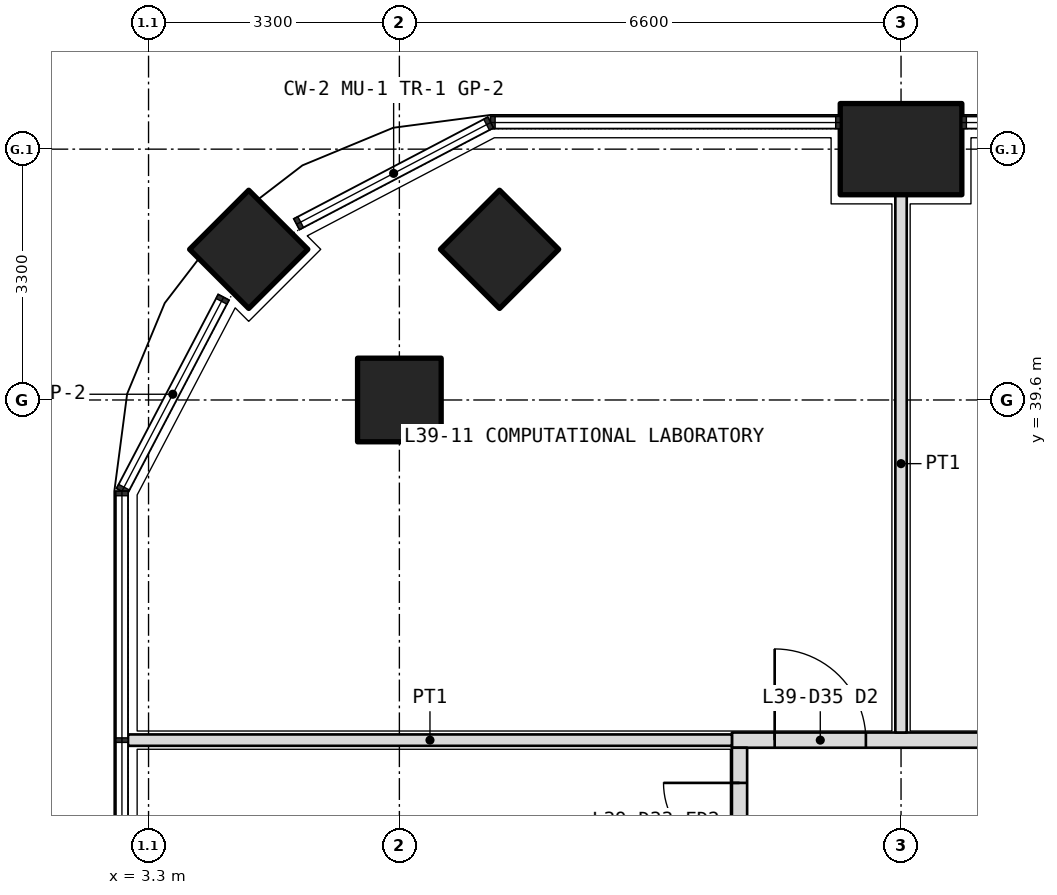
"""IFC4 building model, lengths in metres.
Left out: names, types, materials, properties, quantities, classifications, styles, units other than length and angle.
Written with IfcOpenShell. Run it as: python <this file> out.ifc"""

import sys

from ifc_helpers import new_model, si_unit, direction, frame, frame_2d, origin, origin_2d, place, context, subcontext, project, spatial, rectangle, extrude, element, fill, save


model = new_model("IFC4")
c1 = context("Model", 3, precision=1e-05, world=origin(), true_north=direction((0.0, 1.0)))
c2 = subcontext(c1, "Body", "Model", "MODEL_VIEW")
j1 = project(units=[si_unit("LENGTHUNIT", "METRE"), si_unit("PLANEANGLEUNIT", "RADIAN")], contexts=[c1])
p1 = place(None, origin())
s1 = spatial("IfcSite", under=j1, at=p1, CompositionType="ELEMENT")
p2 = place(p1, origin())
s2 = spatial("IfcBuilding", under=s1, at=p2, CompositionType="ELEMENT")
p3 = place(p2, frame((0.0, 0.0, 172.5)))
s3 = spatial("IfcBuildingStorey", under=s2, at=p3, CompositionType="ELEMENT", Elevation=172.5)
p4 = place(p3, frame((4.618, 41.582, 0.0), z_axis=(0.0, 0.0, 1.0), x_axis=(0.707106781187, 0.707106781187, 0.0)))
e1 = element("IfcColumn", 1, at=p4, inside=s3, PredefinedType="COLUMN", context=c2, shape_type="SweptSolid", body=[
    extrude(rectangle(XDim=1.1, YDim=1.1, at=origin_2d()), origin(), (0.0, 0.0, 1.0), 4.2),
])
p5 = place(p3, frame((13.2, 42.9, 0.0), z_axis=(0.0, 0.0, 1.0), x_axis=(1.0, 0.0, 0.0)))
e2 = element("IfcColumn", 2, at=p5, inside=s3, PredefinedType="COLUMN", context=c2, shape_type="SweptSolid", body=[
    extrude(rectangle(XDim=1.6, YDim=1.2, at=origin_2d()), origin(), (0.0, 0.0, 1.0), 4.2),
])
for number, where, z_axis, x_axis in (
    (3, (6.6, 39.6, 0.0), (0.0, 0.0, 1.0), (1.0, 0.0, 0.0)),
    (4, (7.918, 41.582, 0.0), (0.0, 0.0, 1.0), (0.707, 0.707, 0.0)),
):
    element("IfcColumn", number, at=place(p3, frame(where, z_axis=z_axis, x_axis=x_axis)), inside=s3, PredefinedType="COLUMN", context=c2, shape_type="SweptSolid", body=[
        extrude(rectangle(XDim=1.1, YDim=1.1, at=origin_2d()), origin(), (0.0, 0.0, 1.0), 4.2),
    ])
p6 = place(p3, frame((10.975, 35.125, 0.0), z_axis=(0.0, 0.0, 1.0), x_axis=(1.0, 0.0, 0.0)))
e5 = element("IfcWall", 5, at=p6, inside=s3, PredefinedType="PARTITIONING", context=c2, shape_type="SweptSolid", body=[
    extrude(rectangle(XDim=30.85, YDim=0.2, at=frame_2d((15.425, 0.0))), origin(), (0.0, 0.0, 1.0), 2.85),
])
p7 = place(p6, frame((0.562, 0.0, 0.0)))
e6 = element("IfcOpeningElement", 6, at=p7, cuts=e5, PredefinedType="OPENING", context=c2, shape_type="SweptSolid", body=[
    extrude(rectangle(XDim=1.2, YDim=2.1, at=frame_2d((0.6, 1.05))), frame((0.0, 0.11, 0.0), z_axis=(0.0, -1.0, 0.0), x_axis=(1.0, 0.0, 0.0)), (0.0, 0.0, 1.0), 0.22),
])
p8 = place(p6, frame((8.225, 0.0, 0.0)))
e7 = element("IfcOpeningElement", 7, at=p8, cuts=e5, PredefinedType="OPENING", context=c2, shape_type="SweptSolid", body=[
    extrude(rectangle(XDim=1.2, YDim=2.1, at=frame_2d((0.6, 1.05))), frame((0.0, 0.11, 0.0), z_axis=(0.0, -1.0, 0.0), x_axis=(1.0, 0.0, 0.0)), (0.0, 0.0, 1.0), 0.22),
])
p9 = place(p6, frame((16.625, 0.0, 0.0)))
e8 = element("IfcOpeningElement", 8, at=p9, cuts=e5, PredefinedType="OPENING", context=c2, shape_type="SweptSolid", body=[
    extrude(rectangle(XDim=1.0, YDim=2.1, at=frame_2d((0.5, 1.05))), frame((0.0, 0.11, 0.0), z_axis=(0.0, -1.0, 0.0), x_axis=(1.0, 0.0, 0.0)), (0.0, 0.0, 1.0), 0.22),
])
p10 = place(p6, frame((19.925, 0.0, 0.0)))
e9 = element("IfcOpeningElement", 9, at=p10, cuts=e5, PredefinedType="OPENING", context=c2, shape_type="SweptSolid", body=[
    extrude(rectangle(XDim=1.0, YDim=2.1, at=frame_2d((0.5, 1.05))), frame((0.0, 0.11, 0.0), z_axis=(0.0, -1.0, 0.0), x_axis=(1.0, 0.0, 0.0)), (0.0, 0.0, 1.0), 0.22),
])
p11 = place(p6, frame((23.075, 0.0, 0.0)))
e10 = element("IfcOpeningElement", 10, at=p11, cuts=e5, PredefinedType="OPENING", context=c2, shape_type="SweptSolid", body=[
    extrude(rectangle(XDim=1.2, YDim=2.1, at=frame_2d((0.6, 1.05))), frame((0.0, 0.11, 0.0), z_axis=(0.0, -1.0, 0.0), x_axis=(1.0, 0.0, 0.0)), (0.0, 0.0, 1.0), 0.22),
])
p12 = place(p6, frame((27.438, 0.0, 0.0)))
e11 = element("IfcOpeningElement", 11, at=p12, cuts=e5, PredefinedType="OPENING", context=c2, shape_type="SweptSolid", body=[
    extrude(rectangle(XDim=1.2, YDim=2.1, at=frame_2d((0.6, 1.05))), frame((0.0, 0.11, 0.0), z_axis=(0.0, -1.0, 0.0), x_axis=(1.0, 0.0, 0.0)), (0.0, 0.0, 1.0), 0.22),
])
p13 = place(p3, frame((11.075, 33.0, 0.0), z_axis=(0.0, 0.0, 1.0), x_axis=(0.0, 1.0, 0.0)))
e12 = element("IfcWall", 12, at=p13, inside=s3, PredefinedType="PARTITIONING", context=c2, shape_type="SweptSolid", body=[
    extrude(rectangle(XDim=2.025, YDim=0.2, at=frame_2d((1.012, 0.0))), origin(), (0.0, 0.0, 1.0), 2.85),
])
p14 = place(p13, frame((0.562, 0.0, 0.0)))
e13 = element("IfcOpeningElement", 13, at=p14, cuts=e12, PredefinedType="OPENING", context=c2, shape_type="SweptSolid", body=[
    extrude(rectangle(XDim=1.0, YDim=2.1, at=frame_2d((0.5, 1.05))), frame((0.0, 0.11, 0.0), z_axis=(0.0, -1.0, 0.0), x_axis=(1.0, 0.0, 0.0)), (0.0, 0.0, 1.0), 0.22),
])
p15 = place(p3, frame((3.03, 35.125, 0.0), z_axis=(0.0, 0.0, 1.0), x_axis=(1.0, 0.0, 0.0)))
e14 = element("IfcWall", 14, at=p15, inside=s3, PredefinedType="PARTITIONING", context=c2, shape_type="SweptSolid", body=[
    extrude(rectangle(XDim=7.945, YDim=0.15, at=frame_2d((3.973, 0.0))), origin(), (0.0, 0.0, 1.0), 2.7),
])
p16 = place(p3, frame((13.2, 42.3, 0.0), z_axis=(0.0, 0.0, 1.0), x_axis=(0.0, -1.0, 0.0)))
e15 = element("IfcWall", 15, at=p16, inside=s3, PredefinedType="PARTITIONING", context=c2, shape_type="SweptSolid", body=[
    extrude(rectangle(XDim=7.075, YDim=0.15, at=frame_2d((3.538, 0.0))), origin(), (0.0, 0.0, 1.0), 2.85),
])
p17 = place(p7, origin())
e16 = element("IfcDoor", 16, at=p17, inside=s3, OperationType="DOUBLE_DOOR_SINGLE_SWING", PredefinedType="DOOR", context=c2, shape_type="SweptSolid", body=[
    extrude(rectangle(XDim=1.2, YDim=2.1, at=frame_2d((0.6, 1.05))), frame((0.0, 0.025, 0.0), z_axis=(0.0, -1.0, 0.0), x_axis=(1.0, 0.0, 0.0)), (0.0, 0.0, 1.0), 0.05),
])
fill(e6, e16)
p18 = place(p14, origin())
e17 = element("IfcDoor", 17, at=p18, inside=s3, OperationType="SINGLE_SWING_RIGHT", PredefinedType="DOOR", context=c2, shape_type="SweptSolid", body=[
    extrude(rectangle(XDim=1.0, YDim=2.1, at=frame_2d((0.5, 1.05))), frame((0.0, 0.025, 0.0), z_axis=(0.0, -1.0, 0.0), x_axis=(1.0, 0.0, 0.0)), (0.0, 0.0, 1.0), 0.05),
])
fill(e13, e17)
save(model, sys.argv[1])
